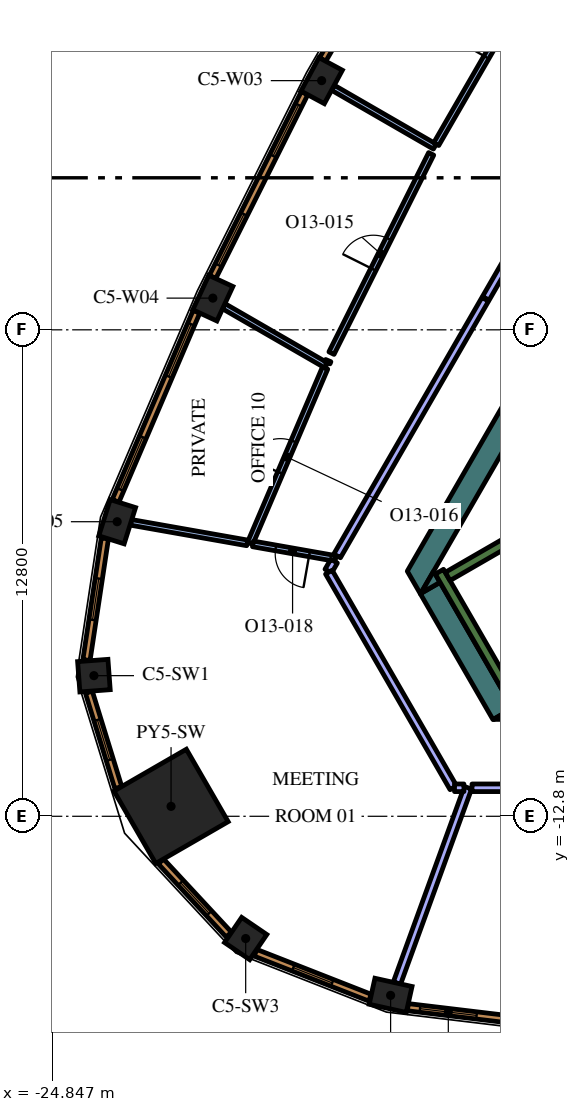
"""IFC4 building model, lengths in metres.
Left out: names, types, materials, properties, quantities, classifications, styles, units other than length and angle.
Written with IfcOpenShell. Run it as: python <this file> out.ifc"""

import sys

from ifc_helpers import new_model, si_unit, direction, frame, frame_2d, origin, origin_2d, place, context, subcontext, project, spatial, polyline, rectangle, outline, extrude, element, fill, save


model = new_model("IFC4")
c1 = context("Model", 3, precision=1e-05, world=origin(), true_north=direction((0.0, 1.0)))
c2 = subcontext(c1, "Body", "Model", "MODEL_VIEW")
j1 = project(units=[si_unit("LENGTHUNIT", "METRE"), si_unit("PLANEANGLEUNIT", "RADIAN")], contexts=[c1])
p1 = place(None, origin())
s1 = spatial("IfcSite", under=j1, at=p1, CompositionType="ELEMENT")
p2 = place(p1, origin())
s2 = spatial("IfcBuilding", under=s1, at=p2, CompositionType="ELEMENT")
p3 = place(p2, frame((0.0, 0.0, 292.2)))
s3 = spatial("IfcBuildingStorey", under=s2, at=p3, CompositionType="ELEMENT", Elevation=292.2)
p4 = place(p3, frame((-21.718, -12.539, 0.0), z_axis=(0.0, 0.0, 1.0), x_axis=(-0.866025403784, -0.5, 0.0)))
e1 = element("IfcColumn", 1, at=p4, inside=s3, PredefinedType="COLUMN", context=c2, shape_type="SweptSolid", body=[
    extrude(rectangle(XDim=2.2, YDim=2.2, at=origin_2d()), origin(), (0.0, 0.0, 1.0), 4.2),
])
for number, where, z_axis, x_axis in (
    (2, (-15.941, -17.512, 0.0), (0.0, 0.0, 1.0), (0.976, -0.217, 0.0)),
    (3, (-17.756, 6.557, 0.0), (0.0, 0.0, 1.0), (-0.474, -0.881, 0.0)),
    (4, (-20.619, 0.834, 0.0), (0.0, 0.0, 1.0), (-0.421, -0.907, 0.0)),
    (5, (-23.136, -5.049, 0.0), (0.0, 0.0, 1.0), (-0.3, -0.954, 0.0)),
):
    element("IfcColumn", number, at=place(p3, frame(where, z_axis=z_axis, x_axis=x_axis)), inside=s3, PredefinedType="COLUMN", context=c2, shape_type="SweptSolid", body=[
        extrude(rectangle(XDim=1.0, YDim=0.7, at=origin_2d()), origin(), (0.0, 0.0, 1.0), 4.2),
    ])
for number, where, z_axis, x_axis in (
    (6, (-23.748, -9.1, 0.0), (0.0, 0.0, 1.0), (0.075, -0.997, 0.0)),
    (7, (-19.754, -16.017, 0.0), (0.0, 0.0, 1.0), (0.826, -0.563, 0.0)),
):
    element("IfcColumn", number, at=place(p3, frame(where, z_axis=z_axis, x_axis=x_axis)), inside=s3, PredefinedType="COLUMN", context=c2, shape_type="SweptSolid", body=[
        extrude(rectangle(XDim=0.8, YDim=0.8, at=origin_2d()), origin(), (0.0, 0.0, 1.0), 4.2),
    ])
p5 = place(p3, origin())
e8 = element("IfcWall", 8, at=p5, inside=s3, PredefinedType="SOLIDWALL", context=c2, shape_type="SweptSolid", body=[
    extrude(outline(polyline([(-15.502, -6.35), (-4.912, 11.992), (-4.393, 11.692), (-10.815, 0.569), (-10.84, 0.583), (-10.84, 0.583), (-10.84, 0.583), (-10.965, 0.367), (-10.965, 0.367), (-10.965, 0.367), (-10.94, 0.352), (-11.033, 0.191), (-14.809, -6.35), (-15.156, -6.95), (-15.502, -6.35)])), origin(), (0.0, 0.0, 1.0), 4.2),
])
p6 = place(p3, frame((-14.899, -6.795, 0.0), z_axis=(0.0, 0.0, 1.0), x_axis=(0.499950938802, -0.866053727428, 0.0)))
e9 = element("IfcWall", 9, at=p6, inside=s3, PredefinedType="SOLIDWALL", context=c2, shape_type="SweptSolid", body=[
    extrude(rectangle(XDim=3.823, YDim=0.6, at=frame_2d((1.912, 0.0))), origin(), (0.0, 0.0, 1.0), 4.2),
])
e10 = element("IfcWall", 10, at=p5, inside=s3, PredefinedType="SOLIDWALL", context=c2, shape_type="SweptSolid", body=[
    extrude(outline(polyline([(-14.64, -6.643), (-15.147, -6.936), (-14.809, -6.35), (-14.64, -6.643)])), origin(), (0.0, 0.0, 1.0), 4.2),
])
e11 = element("IfcWall", 11, at=p5, inside=s3, PredefinedType="SOLIDWALL", context=c2, shape_type="SweptSolid", body=[
    extrude(outline(polyline([(-12.557, -10.25), (-13.233, -10.25), (-12.726, -9.957), (-12.557, -10.25)])), origin(), (0.0, 0.0, 1.0), 4.2),
])
p7 = place(p3, frame((-12.84, -9.511, 0.0), z_axis=(0.0, 0.0, 1.0), x_axis=(-0.499997733992, 0.866026712061, 0.0)))
e12 = element("IfcWall", 12, at=p7, inside=s3, PredefinedType="SOLIDWALL", context=c2, shape_type="SweptSolid", body=[
    extrude(rectangle(XDim=3.634, YDim=0.25, at=frame_2d((1.817, 0.0))), origin(), (0.0, 0.0, 1.0), 4.2),
])
p8 = place(p3, frame((-14.44, -6.49, 0.0), z_axis=(0.0, 0.0, 1.0), x_axis=(0.866022966069, 0.500004222222, 0.0)))
e13 = element("IfcWall", 13, at=p8, inside=s3, PredefinedType="SOLIDWALL", context=c2, shape_type="SweptSolid", body=[
    extrude(rectangle(XDim=6.8, YDim=0.25, at=frame_2d((3.4, 0.0))), origin(), (0.0, 0.0, 1.0), 4.2),
])
p9 = place(p3, frame((-15.774, -17.19, 0.0), z_axis=(0.0, 0.0, 1.0), x_axis=(0.341821907823, 0.93976474893, 0.0)))
e14 = element("IfcWall", 14, at=p9, inside=s3, PredefinedType="PARTITIONING", context=c2, shape_type="SweptSolid", body=[
    extrude(rectangle(XDim=5.469, YDim=0.2, at=frame_2d((2.735, 0.0))), origin(), (0.0, 0.0, 1.0), 3.55),
])
p10 = place(p3, frame((-13.799, -12.05, 0.0), z_axis=(0.0, 0.0, 1.0), x_axis=(1.0, 0.0, 0.0)))
e15 = element("IfcWall", 15, at=p10, inside=s3, PredefinedType="PARTITIONING", context=c2, shape_type="SweptSolid", body=[
    extrude(rectangle(XDim=7.769, YDim=0.2, at=frame_2d((3.884, 0.0))), origin(), (0.0, 0.0, 1.0), 3.55),
])
p11 = place(p10, frame((3.0, 0.0, 0.0)))
e16 = element("IfcOpeningElement", 16, at=p11, cuts=e15, PredefinedType="OPENING", context=c2, shape_type="SweptSolid", body=[
    extrude(rectangle(XDim=1.8, YDim=2.1, at=frame_2d((0.9, 1.05))), frame((0.0, 0.11, 0.0), z_axis=(0.0, -1.0, 0.0), x_axis=(1.0, 0.0, 0.0)), (0.0, 0.0, 1.0), 0.22),
])
p12 = place(p3, frame((-14.777, 4.822, 0.0), z_axis=(0.0, 0.0, 1.0), x_axis=(-0.865992557167, 0.500056887695, 0.0)))
e17 = element("IfcWall", 17, at=p12, inside=s3, PredefinedType="PARTITIONING", context=c2, shape_type="SweptSolid", body=[
    extrude(rectangle(XDim=3.096, YDim=0.15, at=frame_2d((1.548, 0.0))), origin(), (0.0, 0.0, 1.0), 3.55),
])
p13 = place(p3, frame((-14.74, 4.887, 0.0), z_axis=(0.0, 0.0, 1.0), x_axis=(0.500007141444, 0.86602128063, 0.0)))
e18 = element("IfcWall", 18, at=p13, inside=s3, PredefinedType="PARTITIONING", context=c2, shape_type="SweptSolid", body=[
    extrude(rectangle(XDim=6.137, YDim=0.15, at=frame_2d((3.068, 0.0))), origin(), (0.0, 0.0, 1.0), 3.55),
])
p14 = place(p13, frame((2.637, 0.0, 0.0)))
e19 = element("IfcOpeningElement", 19, at=p14, cuts=e18, PredefinedType="OPENING", context=c2, shape_type="SweptSolid", body=[
    extrude(rectangle(XDim=0.9, YDim=2.1, at=frame_2d((0.45, 1.05))), frame((0.0, 0.085, 0.0), z_axis=(0.0, -1.0, 0.0), x_axis=(1.0, 0.0, 0.0)), (0.0, 0.0, 1.0), 0.17),
])
p15 = place(p3, frame((-17.635, -0.936, 0.0), z_axis=(0.0, 0.0, 1.0), x_axis=(-0.866044607523, 0.499966736674, 0.0)))
e20 = element("IfcWall", 20, at=p15, inside=s3, PredefinedType="PARTITIONING", context=c2, shape_type="SweptSolid", body=[
    extrude(rectangle(XDim=3.115, YDim=0.15, at=frame_2d((1.557, 0.0))), origin(), (0.0, 0.0, 1.0), 3.55),
])
p16 = place(p3, frame((-17.497, -0.613, 0.0), z_axis=(0.0, 0.0, 1.0), x_axis=(0.447480081559, 0.89429389834, 0.0)))
e21 = element("IfcWall", 21, at=p16, inside=s3, PredefinedType="PARTITIONING", context=c2, shape_type="SweptSolid", body=[
    extrude(rectangle(XDim=5.863, YDim=0.15, at=frame_2d((2.931, 0.0))), origin(), (0.0, 0.0, 1.0), 3.55),
])
p17 = place(p16, frame((2.463, 0.0, 0.0)))
e22 = element("IfcOpeningElement", 22, at=p17, cuts=e21, PredefinedType="OPENING", context=c2, shape_type="SweptSolid", body=[
    extrude(rectangle(XDim=0.9, YDim=2.1, at=frame_2d((0.45, 1.05))), frame((0.0, 0.085, 0.0), z_axis=(0.0, -1.0, 0.0), x_axis=(1.0, 0.0, 0.0)), (0.0, 0.0, 1.0), 0.17),
])
p18 = place(p3, frame((-17.581, -0.81, 0.0), z_axis=(0.0, 0.0, 1.0), x_axis=(-0.390033474923, -0.92080067791, 0.0)))
e23 = element("IfcWall", 23, at=p18, inside=s3, PredefinedType="PARTITIONING", context=c2, shape_type="SweptSolid", body=[
    extrude(rectangle(XDim=0.061, YDim=0.15, at=frame_2d((0.03, 0.0))), origin(), (0.0, 0.0, 1.0), 3.55),
])
p19 = place(p3, frame((-19.639, -5.62, 0.0), z_axis=(0.0, 0.0, 1.0), x_axis=(0.393349802257, 0.919388891092, 0.0)))
e24 = element("IfcWall", 24, at=p19, inside=s3, PredefinedType="PARTITIONING", context=c2, shape_type="SweptSolid", body=[
    extrude(rectangle(XDim=5.019, YDim=0.15, at=frame_2d((2.51, 0.0))), origin(), (0.0, 0.0, 1.0), 3.55),
])
p20 = place(p19, frame((2.019, 0.0, 0.0)))
e25 = element("IfcOpeningElement", 25, at=p20, cuts=e24, PredefinedType="OPENING", context=c2, shape_type="SweptSolid", body=[
    extrude(rectangle(XDim=0.9, YDim=2.1, at=frame_2d((0.45, 1.05))), frame((0.0, 0.085, 0.0), z_axis=(0.0, -1.0, 0.0), x_axis=(1.0, 0.0, 0.0)), (0.0, 0.0, 1.0), 0.17),
])
p21 = place(p3, frame((-19.714, -5.606, 0.0), z_axis=(0.0, 0.0, 1.0), x_axis=(-0.984768527071, 0.173870492294, 0.0)))
e26 = element("IfcWall", 26, at=p21, inside=s3, PredefinedType="PARTITIONING", context=c2, shape_type="SweptSolid", body=[
    extrude(rectangle(XDim=3.107, YDim=0.15, at=frame_2d((1.554, 0.0))), origin(), (0.0, 0.0, 1.0), 3.55),
])
p22 = place(p3, frame((-17.388, -6.017, 0.0), z_axis=(0.0, 0.0, 1.0), x_axis=(-0.984764633635, 0.173892542513, 0.0)))
e27 = element("IfcWall", 27, at=p22, inside=s3, PredefinedType="PARTITIONING", context=c2, shape_type="SweptSolid", body=[
    extrude(rectangle(XDim=2.208, YDim=0.15, at=frame_2d((1.104, 0.0))), origin(), (0.0, 0.0, 1.0), 3.55),
])
p23 = place(p22, frame((0.7, 0.0, 0.0)))
e28 = element("IfcOpeningElement", 28, at=p23, cuts=e27, PredefinedType="OPENING", context=c2, shape_type="SweptSolid", body=[
    extrude(rectangle(XDim=0.9, YDim=2.1, at=frame_2d((0.45, 1.05))), frame((0.0, 0.085, 0.0), z_axis=(0.0, -1.0, 0.0), x_axis=(1.0, 0.0, 0.0)), (0.0, 0.0, 1.0), 0.17),
])
p24 = place(p3, frame((-7.436, 11.221, 0.0), z_axis=(0.0, 0.0, 1.0), x_axis=(-0.49999894854, -0.866026010844, 0.0)))
e29 = element("IfcWall", 29, at=p24, inside=s3, PredefinedType="PARTITIONING", context=c2, shape_type="SweptSolid", body=[
    extrude(rectangle(XDim=12.0, YDim=0.2, at=frame_2d((6.0, 0.0))), origin(), (0.0, 0.0, 1.0), 3.55),
])
p25 = place(p24, frame((5.5, 0.0, 0.0)))
e30 = element("IfcOpeningElement", 30, at=p25, cuts=e29, PredefinedType="OPENING", context=c2, shape_type="SweptSolid", body=[
    extrude(rectangle(XDim=1.0, YDim=2.1, at=frame_2d((0.5, 1.05))), frame((0.0, 0.11, 0.0), z_axis=(0.0, -1.0, 0.0), x_axis=(1.0, 0.0, 0.0)), (0.0, 0.0, 1.0), 0.22),
])
p26 = place(p3, frame((-13.451, 0.803, 0.0), z_axis=(0.0, 0.0, 1.0), x_axis=(-0.499979102685, -0.866037468519, 0.0)))
e31 = element("IfcWall", 31, at=p26, inside=s3, PredefinedType="PARTITIONING", context=c2, shape_type="SweptSolid", body=[
    extrude(rectangle(XDim=7.795, YDim=0.2, at=frame_2d((3.897, 0.0))), origin(), (0.0, 0.0, 1.0), 3.55),
])
p27 = place(p3, frame((-17.428, -6.086, 0.0), z_axis=(0.0, 0.0, 1.0), x_axis=(-0.499930512259, -0.866065518833, 0.0)))
e32 = element("IfcWall", 32, at=p27, inside=s3, PredefinedType="PARTITIONING", context=c2, shape_type="SweptSolid", body=[
    extrude(rectangle(XDim=0.305, YDim=0.2, at=frame_2d((0.152, 0.0))), origin(), (0.0, 0.0, 1.0), 3.55),
])
p28 = place(p3, frame((-17.565, -6.376, 0.0), z_axis=(0.0, 0.0, 1.0), x_axis=(0.499994477444, -0.86602859221, 0.0)))
e33 = element("IfcWall", 33, at=p28, inside=s3, PredefinedType="PARTITIONING", context=c2, shape_type="SweptSolid", body=[
    extrude(rectangle(XDim=6.552, YDim=0.2, at=frame_2d((3.276, 0.0))), origin(), (0.0, 0.0, 1.0), 3.55),
])
p29 = place(p3, frame((-14.26, -12.05, 0.0), z_axis=(0.0, 0.0, 1.0), x_axis=(1.0, 0.0, 0.0)))
e34 = element("IfcWall", 34, at=p29, inside=s3, PredefinedType="PARTITIONING", context=c2, shape_type="SweptSolid", body=[
    extrude(rectangle(XDim=0.248, YDim=0.2, at=frame_2d((0.124, 0.0))), origin(), (0.0, 0.0, 1.0), 3.55),
])
p30 = place(p3, frame((-15.487, -17.823, 0.0), z_axis=(0.0, 0.0, 1.0), x_axis=(0.992885582795, -0.119072328769, 0.0)))
e35 = element("IfcWall", 35, at=p30, inside=s3, PredefinedType="SOLIDWALL", context=c2, shape_type="SweptSolid", body=[
    extrude(rectangle(XDim=5.415, YDim=0.19, at=frame_2d((2.708, 0.0))), origin(), (0.0, 0.0, 1.0), 3.95),
])
p31 = place(p30, frame((0.323, 0.0, 0.6)))
e36 = element("IfcOpeningElement", 36, at=p31, cuts=e35, PredefinedType="OPENING", context=c2, shape_type="SweptSolid", body=[
    extrude(rectangle(XDim=1.5, YDim=2.85, at=frame_2d((0.75, 1.425))), frame((0.0, 0.105, 0.0), z_axis=(0.0, -1.0, 0.0), x_axis=(1.0, 0.0, 0.0)), (0.0, 0.0, 1.0), 0.21),
])
p32 = place(p30, frame((3.558, 0.0, 0.6)))
e37 = element("IfcOpeningElement", 37, at=p32, cuts=e35, PredefinedType="OPENING", context=c2, shape_type="SweptSolid", body=[
    extrude(rectangle(XDim=1.5, YDim=2.85, at=frame_2d((0.75, 1.425))), frame((0.0, 0.105, 0.0), z_axis=(0.0, -1.0, 0.0), x_axis=(1.0, 0.0, 0.0)), (0.0, 0.0, 1.0), 0.21),
])
p33 = place(p3, frame((-15.025, 11.796, 0.0), z_axis=(0.0, 0.0, 1.0), x_axis=(-0.500024767483, -0.866011103799, 0.0)))
e38 = element("IfcWall", 38, at=p33, inside=s3, PredefinedType="SOLIDWALL", context=c2, shape_type="SweptSolid", body=[
    extrude(rectangle(XDim=5.406, YDim=0.19, at=frame_2d((2.703, 0.0))), origin(), (0.0, 0.0, 1.0), 3.95),
])
p34 = place(p33, frame((0.346, 0.0, 0.6)))
e39 = element("IfcOpeningElement", 39, at=p34, cuts=e38, PredefinedType="OPENING", context=c2, shape_type="SweptSolid", body=[
    extrude(rectangle(XDim=1.5, YDim=2.85, at=frame_2d((0.75, 1.425))), frame((0.0, 0.105, 0.0), z_axis=(0.0, -1.0, 0.0), x_axis=(1.0, 0.0, 0.0)), (0.0, 0.0, 1.0), 0.21),
])
p35 = place(p33, frame((3.559, 0.0, 0.6)))
e40 = element("IfcOpeningElement", 40, at=p35, cuts=e38, PredefinedType="OPENING", context=c2, shape_type="SweptSolid", body=[
    extrude(rectangle(XDim=1.5, YDim=2.85, at=frame_2d((0.75, 1.425))), frame((0.0, 0.105, 0.0), z_axis=(0.0, -1.0, 0.0), x_axis=(1.0, 0.0, 0.0)), (0.0, 0.0, 1.0), 0.21),
])
p36 = place(p3, frame((-18.206, 6.227, 0.0), z_axis=(0.0, 0.0, 1.0), x_axis=(-0.447484531401, -0.894291671747, 0.0)))
e41 = element("IfcWall", 41, at=p36, inside=s3, PredefinedType="SOLIDWALL", context=c2, shape_type="SweptSolid", body=[
    extrude(rectangle(XDim=5.406, YDim=0.19, at=frame_2d((2.703, 0.0))), origin(), (0.0, 0.0, 1.0), 3.95),
])
p37 = place(p36, frame((0.346, 0.0, 0.6)))
e42 = element("IfcOpeningElement", 42, at=p37, cuts=e41, PredefinedType="OPENING", context=c2, shape_type="SweptSolid", body=[
    extrude(rectangle(XDim=1.5, YDim=2.85, at=frame_2d((0.75, 1.425))), frame((0.0, 0.105, 0.0), z_axis=(0.0, -1.0, 0.0), x_axis=(1.0, 0.0, 0.0)), (0.0, 0.0, 1.0), 0.21),
])
p38 = place(p36, frame((3.559, 0.0, 0.6)))
e43 = element("IfcOpeningElement", 43, at=p38, cuts=e41, PredefinedType="OPENING", context=c2, shape_type="SweptSolid", body=[
    extrude(rectangle(XDim=1.5, YDim=2.85, at=frame_2d((0.75, 1.425))), frame((0.0, 0.105, 0.0), z_axis=(0.0, -1.0, 0.0), x_axis=(1.0, 0.0, 0.0)), (0.0, 0.0, 1.0), 0.21),
])
p39 = place(p3, frame((-21.049, 0.478, 0.0), z_axis=(0.0, 0.0, 1.0), x_axis=(-0.393347848476, -0.919389726992, 0.0)))
e44 = element("IfcWall", 44, at=p39, inside=s3, PredefinedType="SOLIDWALL", context=c2, shape_type="SweptSolid", body=[
    extrude(rectangle(XDim=5.415, YDim=0.19, at=frame_2d((2.708, 0.0))), origin(), (0.0, 0.0, 1.0), 3.95),
])
p40 = place(p39, frame((0.357, 0.0, 0.6)))
e45 = element("IfcOpeningElement", 45, at=p40, cuts=e44, PredefinedType="OPENING", context=c2, shape_type="SweptSolid", body=[
    extrude(rectangle(XDim=1.5, YDim=2.85, at=frame_2d((0.75, 1.425))), frame((0.0, 0.105, 0.0), z_axis=(0.0, -1.0, 0.0), x_axis=(1.0, 0.0, 0.0)), (0.0, 0.0, 1.0), 0.21),
])
p41 = place(p39, frame((3.593, 0.0, 0.6)))
e46 = element("IfcOpeningElement", 46, at=p41, cuts=e44, PredefinedType="OPENING", context=c2, shape_type="SweptSolid", body=[
    extrude(rectangle(XDim=1.5, YDim=2.85, at=frame_2d((0.75, 1.425))), frame((0.0, 0.105, 0.0), z_axis=(0.0, -1.0, 0.0), x_axis=(1.0, 0.0, 0.0)), (0.0, 0.0, 1.0), 0.21),
])
p42 = place(p3, frame((-23.46, -5.488, 0.0), z_axis=(0.0, 0.0, 1.0), x_axis=(-0.149421055602, -0.988773658702, 0.0)))
e47 = element("IfcWall", 47, at=p42, inside=s3, PredefinedType="SOLIDWALL", context=c2, shape_type="SweptSolid", body=[
    extrude(rectangle(XDim=3.237, YDim=0.19, at=frame_2d((1.618, 0.0))), origin(), (0.0, 0.0, 1.0), 3.95),
])
p43 = place(p42, frame((1.068, 0.0, 0.6)))
e48 = element("IfcOpeningElement", 48, at=p43, cuts=e47, PredefinedType="OPENING", context=c2, shape_type="SweptSolid", body=[
    extrude(rectangle(XDim=1.1, YDim=2.85, at=frame_2d((0.55, 1.425))), frame((0.0, 0.105, 0.0), z_axis=(0.0, -1.0, 0.0), x_axis=(1.0, 0.0, 0.0)), (0.0, 0.0, 1.0), 0.21),
])
p44 = place(p3, frame((-23.881, -9.535, 0.0), z_axis=(0.0, 0.0, 1.0), x_axis=(0.294706210429, -0.9555879078, 0.0)))
e49 = element("IfcWall", 49, at=p44, inside=s3, PredefinedType="SOLIDWALL", context=c2, shape_type="SweptSolid", body=[
    extrude(rectangle(XDim=2.627, YDim=0.19, at=frame_2d((1.313, 0.0))), origin(), (0.0, 0.0, 1.0), 3.95),
])
p45 = place(p44, frame((0.763, 0.0, 0.6)))
e50 = element("IfcOpeningElement", 50, at=p45, cuts=e49, PredefinedType="OPENING", context=c2, shape_type="SweptSolid", body=[
    extrude(rectangle(XDim=1.1, YDim=2.85, at=frame_2d((0.55, 1.425))), frame((0.0, 0.105, 0.0), z_axis=(0.0, -1.0, 0.0), x_axis=(1.0, 0.0, 0.0)), (0.0, 0.0, 1.0), 0.21),
])
p46 = place(p3, frame((-21.985, -13.988, 0.0), z_axis=(0.0, 0.0, 1.0), x_axis=(0.680219354823, -0.733008614768, 0.0)))
e51 = element("IfcWall", 51, at=p46, inside=s3, PredefinedType="SOLIDWALL", context=c2, shape_type="SweptSolid", body=[
    extrude(rectangle(XDim=2.627, YDim=0.19, at=frame_2d((1.313, 0.0))), origin(), (0.0, 0.0, 1.0), 3.95),
])
p47 = place(p46, frame((0.763, 0.0, 0.6)))
e52 = element("IfcOpeningElement", 52, at=p47, cuts=e51, PredefinedType="OPENING", context=c2, shape_type="SweptSolid", body=[
    extrude(rectangle(XDim=1.1, YDim=2.85, at=frame_2d((0.55, 1.425))), frame((0.0, 0.105, 0.0), z_axis=(0.0, -1.0, 0.0), x_axis=(1.0, 0.0, 0.0)), (0.0, 0.0, 1.0), 0.21),
])
p48 = place(p3, frame((-19.496, -16.392, 0.0), z_axis=(0.0, 0.0, 1.0), x_axis=(0.93100888477, -0.364996515709, 0.0)))
e53 = element("IfcWall", 53, at=p48, inside=s3, PredefinedType="SOLIDWALL", context=c2, shape_type="SweptSolid", body=[
    extrude(rectangle(XDim=3.237, YDim=0.19, at=frame_2d((1.618, 0.0))), origin(), (0.0, 0.0, 1.0), 3.95),
])
p49 = place(p48, frame((1.068, 0.0, 0.6)))
e54 = element("IfcOpeningElement", 54, at=p49, cuts=e53, PredefinedType="OPENING", context=c2, shape_type="SweptSolid", body=[
    extrude(rectangle(XDim=1.1, YDim=2.85, at=frame_2d((0.55, 1.425))), frame((0.0, 0.105, 0.0), z_axis=(0.0, -1.0, 0.0), x_axis=(1.0, 0.0, 0.0)), (0.0, 0.0, 1.0), 0.21),
])
p50 = place(p14, origin())
e55 = element("IfcDoor", 55, at=p50, inside=s3, OperationType="SINGLE_SWING_RIGHT", PredefinedType="DOOR", context=c2, shape_type="SweptSolid", body=[
    extrude(rectangle(XDim=0.9, YDim=2.1, at=frame_2d((0.45, 1.05))), frame((0.0, 0.025, 0.0), z_axis=(0.0, -1.0, 0.0), x_axis=(1.0, 0.0, 0.0)), (0.0, 0.0, 1.0), 0.05),
])
fill(e19, e55)
p51 = place(p17, origin())
e56 = element("IfcDoor", 56, at=p51, inside=s3, OperationType="SINGLE_SWING_LEFT", PredefinedType="DOOR", context=c2, shape_type="SweptSolid", body=[
    extrude(rectangle(XDim=0.9, YDim=2.1, at=frame_2d((0.45, 1.05))), frame((0.0, 0.025, 0.0), z_axis=(0.0, -1.0, 0.0), x_axis=(1.0, 0.0, 0.0)), (0.0, 0.0, 1.0), 0.05),
])
fill(e22, e56)
p52 = place(p20, origin())
e57 = element("IfcDoor", 57, at=p52, inside=s3, OperationType="SINGLE_SWING_LEFT", PredefinedType="DOOR", context=c2, shape_type="SweptSolid", body=[
    extrude(rectangle(XDim=0.9, YDim=2.1, at=frame_2d((0.45, 1.05))), frame((0.0, 0.025, 0.0), z_axis=(0.0, -1.0, 0.0), x_axis=(1.0, 0.0, 0.0)), (0.0, 0.0, 1.0), 0.05),
])
fill(e25, e57)
p53 = place(p23, origin())
e58 = element("IfcDoor", 58, at=p53, inside=s3, OperationType="SINGLE_SWING_RIGHT", PredefinedType="DOOR", context=c2, shape_type="SweptSolid", body=[
    extrude(rectangle(XDim=0.9, YDim=2.1, at=frame_2d((0.45, 1.05))), frame((0.0, 0.025, 0.0), z_axis=(0.0, -1.0, 0.0), x_axis=(1.0, 0.0, 0.0)), (0.0, 0.0, 1.0), 0.05),
])
fill(e28, e58)
p54 = place(p31, origin())
e59 = element("IfcWindow", 59, at=p54, inside=s3, PartitioningType="SINGLE_PANEL", PredefinedType="WINDOW", context=c2, shape_type="SweptSolid", body=[
    extrude(rectangle(XDim=1.5, YDim=2.85, at=frame_2d((0.75, 1.425))), frame((0.0, 0.045, 0.0), z_axis=(0.0, -1.0, 0.0), x_axis=(1.0, 0.0, 0.0)), (0.0, 0.0, 1.0), 0.06),
])
fill(e36, e59)
p55 = place(p37, origin())
e60 = element("IfcWindow", 60, at=p55, inside=s3, PartitioningType="SINGLE_PANEL", PredefinedType="WINDOW", context=c2, shape_type="SweptSolid", body=[
    extrude(rectangle(XDim=1.5, YDim=2.85, at=frame_2d((0.75, 1.425))), frame((0.0, 0.045, 0.0), z_axis=(0.0, -1.0, 0.0), x_axis=(1.0, 0.0, 0.0)), (0.0, 0.0, 1.0), 0.06),
])
fill(e42, e60)
p56 = place(p38, origin())
e61 = element("IfcWindow", 61, at=p56, inside=s3, PartitioningType="SINGLE_PANEL", PredefinedType="WINDOW", context=c2, shape_type="SweptSolid", body=[
    extrude(rectangle(XDim=1.5, YDim=2.85, at=frame_2d((0.75, 1.425))), frame((0.0, 0.045, 0.0), z_axis=(0.0, -1.0, 0.0), x_axis=(1.0, 0.0, 0.0)), (0.0, 0.0, 1.0), 0.06),
])
fill(e43, e61)
p57 = place(p40, origin())
e62 = element("IfcWindow", 62, at=p57, inside=s3, PartitioningType="SINGLE_PANEL", PredefinedType="WINDOW", context=c2, shape_type="SweptSolid", body=[
    extrude(rectangle(XDim=1.5, YDim=2.85, at=frame_2d((0.75, 1.425))), frame((0.0, 0.045, 0.0), z_axis=(0.0, -1.0, 0.0), x_axis=(1.0, 0.0, 0.0)), (0.0, 0.0, 1.0), 0.06),
])
fill(e45, e62)
p58 = place(p41, origin())
e63 = element("IfcWindow", 63, at=p58, inside=s3, PartitioningType="SINGLE_PANEL", PredefinedType="WINDOW", context=c2, shape_type="SweptSolid", body=[
    extrude(rectangle(XDim=1.5, YDim=2.85, at=frame_2d((0.75, 1.425))), frame((0.0, 0.045, 0.0), z_axis=(0.0, -1.0, 0.0), x_axis=(1.0, 0.0, 0.0)), (0.0, 0.0, 1.0), 0.06),
])
fill(e46, e63)
p59 = place(p43, origin())
e64 = element("IfcWindow", 64, at=p59, inside=s3, PartitioningType="SINGLE_PANEL", PredefinedType="WINDOW", context=c2, shape_type="SweptSolid", body=[
    extrude(rectangle(XDim=1.1, YDim=2.85, at=frame_2d((0.55, 1.425))), frame((0.0, 0.045, 0.0), z_axis=(0.0, -1.0, 0.0), x_axis=(1.0, 0.0, 0.0)), (0.0, 0.0, 1.0), 0.06),
])
fill(e48, e64)
p60 = place(p45, origin())
e65 = element("IfcWindow", 65, at=p60, inside=s3, PartitioningType="SINGLE_PANEL", PredefinedType="WINDOW", context=c2, shape_type="SweptSolid", body=[
    extrude(rectangle(XDim=1.1, YDim=2.85, at=frame_2d((0.55, 1.425))), frame((0.0, 0.045, 0.0), z_axis=(0.0, -1.0, 0.0), x_axis=(1.0, 0.0, 0.0)), (0.0, 0.0, 1.0), 0.06),
])
fill(e50, e65)
p61 = place(p47, origin())
e66 = element("IfcWindow", 66, at=p61, inside=s3, PartitioningType="SINGLE_PANEL", PredefinedType="WINDOW", context=c2, shape_type="SweptSolid", body=[
    extrude(rectangle(XDim=1.1, YDim=2.85, at=frame_2d((0.55, 1.425))), frame((0.0, 0.045, 0.0), z_axis=(0.0, -1.0, 0.0), x_axis=(1.0, 0.0, 0.0)), (0.0, 0.0, 1.0), 0.06),
])
fill(e52, e66)
p62 = place(p49, origin())
e67 = element("IfcWindow", 67, at=p62, inside=s3, PartitioningType="SINGLE_PANEL", PredefinedType="WINDOW", context=c2, shape_type="SweptSolid", body=[
    extrude(rectangle(XDim=1.1, YDim=2.85, at=frame_2d((0.55, 1.425))), frame((0.0, 0.045, 0.0), z_axis=(0.0, -1.0, 0.0), x_axis=(1.0, 0.0, 0.0)), (0.0, 0.0, 1.0), 0.06),
])
fill(e54, e67)
save(model, sys.argv[1])
